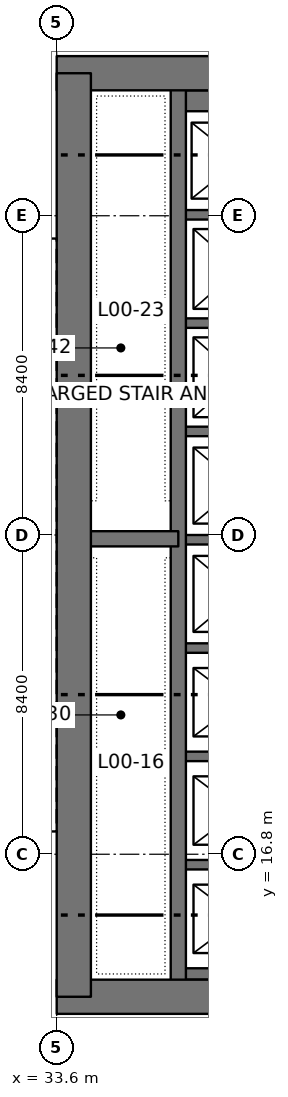
"""IFC4 building model, lengths in metres.
Left out: names, types, materials, properties, quantities, classifications, styles, units other than length and angle.
Written with IfcOpenShell. Run it as: python <this file> out.ifc"""

import sys

from ifc_helpers import new_model, si_unit, direction, frame, frame_2d, origin, place, context, subcontext, project, spatial, rectangle, extrude, element, save


model = new_model("IFC4")
c1 = context("Model", 3, precision=1e-05, world=origin(), true_north=direction((0.0, 1.0)))
c2 = subcontext(c1, "Body", "Model", "MODEL_VIEW")
j1 = project(units=[si_unit("LENGTHUNIT", "METRE"), si_unit("PLANEANGLEUNIT", "RADIAN")], contexts=[c1])
p1 = place(None, origin())
s1 = spatial("IfcSite", under=j1, at=p1, CompositionType="ELEMENT")
p2 = place(p1, origin())
s2 = spatial("IfcBuilding", under=s1, at=p2, CompositionType="ELEMENT")
p3 = place(p2, origin())
s3 = spatial("IfcBuildingStorey", under=s2, at=p3, CompositionType="ELEMENT", Elevation=0.0)
p4 = place(p3, frame((33.6, 13.05, 0.0), z_axis=(0.0, 0.0, 1.0), x_axis=(1.0, 0.0, 0.0)))
e1 = element("IfcWall", 1, at=p4, inside=s3, PredefinedType="SHEAR", context=c2, shape_type="SweptSolid", body=[
    extrude(rectangle(XDim=18.0, YDim=0.9, at=frame_2d((9.0, 0.0))), origin(), (0.0, 0.0, 1.0), 5.4),
])
p5 = place(p4, frame((7.25, 0.0, 0.0)))
e2 = element("IfcOpeningElement", 2, at=p5, cuts=e1, PredefinedType="OPENING", context=c2, shape_type="SweptSolid", body=[
    extrude(rectangle(XDim=1.8, YDim=2.4, at=frame_2d((0.9, 1.2))), frame((0.0, 0.46, 0.0), z_axis=(0.0, -1.0, 0.0), x_axis=(1.0, 0.0, 0.0)), (0.0, 0.0, 1.0), 0.92),
])
p6 = place(p3, frame((33.6, 37.35, 0.0), z_axis=(0.0, 0.0, 1.0), x_axis=(1.0, 0.0, 0.0)))
e3 = element("IfcWall", 3, at=p6, inside=s3, PredefinedType="SHEAR", context=c2, shape_type="SweptSolid", body=[
    extrude(rectangle(XDim=18.0, YDim=0.9, at=frame_2d((9.0, 0.0))), origin(), (0.0, 0.0, 1.0), 5.4),
])
p7 = place(p6, frame((7.25, 0.0, 0.0)))
e4 = element("IfcOpeningElement", 4, at=p7, cuts=e3, PredefinedType="OPENING", context=c2, shape_type="SweptSolid", body=[
    extrude(rectangle(XDim=1.8, YDim=2.4, at=frame_2d((0.9, 1.2))), frame((0.0, 0.46, 0.0), z_axis=(0.0, -1.0, 0.0), x_axis=(1.0, 0.0, 0.0)), (0.0, 0.0, 1.0), 0.92),
])
p8 = place(p3, frame((34.05, 13.05, 0.0), z_axis=(0.0, 0.0, 1.0), x_axis=(0.0, 1.0, 0.0)))
e5 = element("IfcWall", 5, at=p8, inside=s3, PredefinedType="SHEAR", context=c2, shape_type="SweptSolid", body=[
    extrude(rectangle(XDim=24.3, YDim=0.9, at=frame_2d((12.15, 0.0))), origin(), (0.0, 0.0, 1.0), 5.4),
])
p9 = place(p3, frame((36.8, 13.05, 0.0), z_axis=(0.0, 0.0, 1.0), x_axis=(0.0, 1.0, 0.0)))
e6 = element("IfcWall", 6, at=p9, inside=s3, PredefinedType="SHEAR", context=c2, shape_type="SweptSolid", body=[
    extrude(rectangle(XDim=24.3, YDim=0.4, at=frame_2d((12.15, 0.0))), origin(), (0.0, 0.0, 1.0), 5.4),
])
p10 = place(p3, frame((36.8, 25.1, 0.0), z_axis=(0.0, 0.0, 1.0), x_axis=(-1.0, 0.0, 0.0)))
e7 = element("IfcWall", 7, at=p10, inside=s3, PredefinedType="SHEAR", context=c2, shape_type="SweptSolid", body=[
    extrude(rectangle(XDim=2.75, YDim=0.4, at=frame_2d((1.375, 0.0))), origin(), (0.0, 0.0, 1.0), 5.4),
])
p11 = place(p3, frame((40.0, 13.65, 0.0), z_axis=(0.0, 0.0, 1.0), x_axis=(-1.0, 0.0, 0.0)))
e8 = element("IfcWall", 8, at=p11, inside=s3, PredefinedType="SHEAR", context=c2, shape_type="SweptSolid", body=[
    extrude(rectangle(XDim=3.2, YDim=0.3, at=frame_2d((1.6, 0.0))), origin(), (0.0, 0.0, 1.0), 5.4),
])
for number, where, z_axis, x_axis in (
    (9, (40.0, 16.525, 0.0), (0.0, 0.0, 1.0), (-1.0, 0.0, 0.0)),
    (10, (40.0, 19.375, 0.0), (0.0, 0.0, 1.0), (-1.0, 0.0, 0.0)),
    (11, (40.0, 22.225, 0.0), (0.0, 0.0, 1.0), (-1.0, 0.0, 0.0)),
    (12, (40.0, 25.075, 0.0), (0.0, 0.0, 1.0), (-1.0, 0.0, 0.0)),
    (13, (40.0, 27.925, 0.0), (0.0, 0.0, 1.0), (-1.0, 0.0, 0.0)),
    (14, (40.0, 30.775, 0.0), (0.0, 0.0, 1.0), (-1.0, 0.0, 0.0)),
    (15, (40.0, 33.625, 0.0), (0.0, 0.0, 1.0), (-1.0, 0.0, 0.0)),
):
    element("IfcWall", number, at=place(p3, frame(where, z_axis=z_axis, x_axis=x_axis)), inside=s3, PredefinedType="SHEAR", context=c2, shape_type="SweptSolid", body=[
        extrude(rectangle(XDim=3.2, YDim=0.25, at=frame_2d((1.6, 0.0))), origin(), (0.0, 0.0, 1.0), 5.4),
    ])
p12 = place(p3, frame((40.0, 36.625, 0.0), z_axis=(0.0, 0.0, 1.0), x_axis=(-1.0, 0.0, 0.0)))
e16 = element("IfcWall", 16, at=p12, inside=s3, PredefinedType="SHEAR", context=c2, shape_type="SweptSolid", body=[
    extrude(rectangle(XDim=3.2, YDim=0.55, at=frame_2d((1.6, 0.0))), origin(), (0.0, 0.0, 1.0), 5.4),
])
save(model, sys.argv[1])
